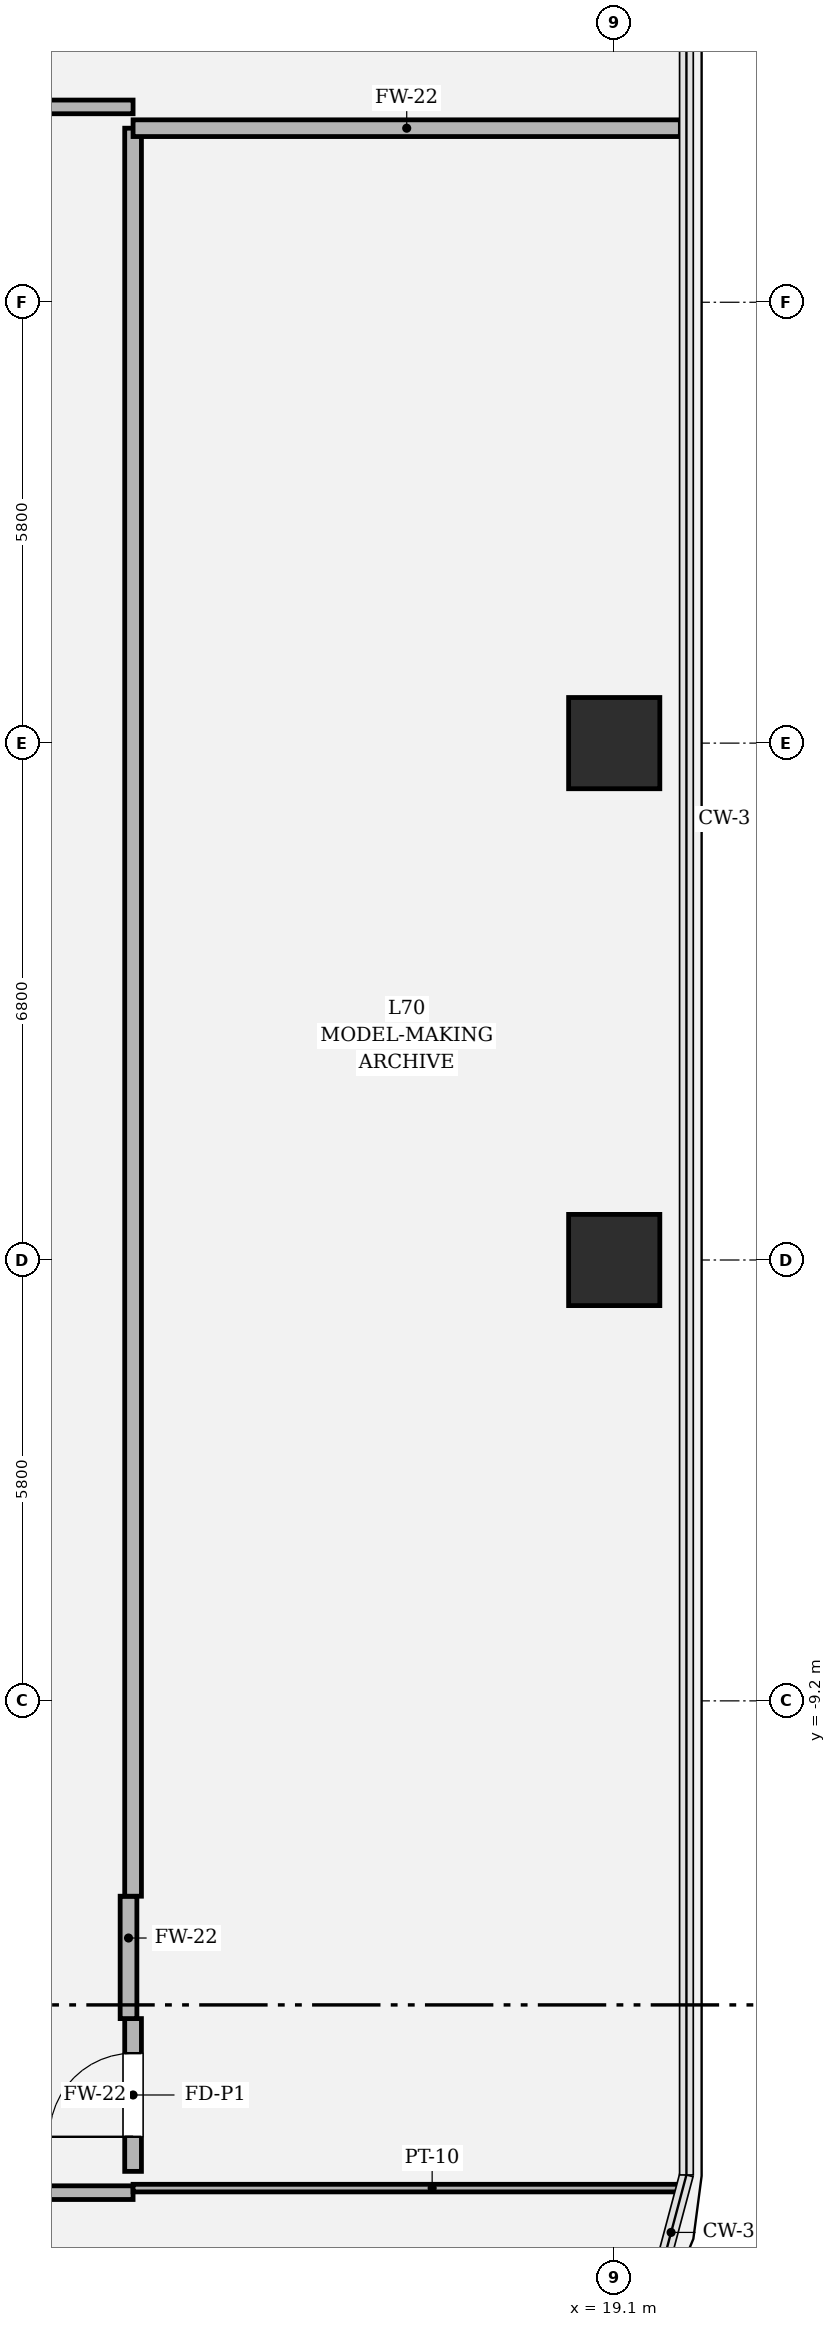
"""IFC4 building model, lengths in metres.
Left out: names, types, materials, properties, quantities, classifications, styles, units other than length and angle.
Written with IfcOpenShell. Run it as: python <this file> out.ifc"""

import sys

from ifc_helpers import new_model, si_unit, direction, frame, frame_2d, origin, origin_2d, place, context, subcontext, project, spatial, rectangle, hollow_rectangle, extrude, element, fill, save


model = new_model("IFC4")
c1 = context("Model", 3, precision=1e-05, world=origin(), true_north=direction((0.0, 1.0)))
c2 = subcontext(c1, "Body", "Model", "MODEL_VIEW")
j1 = project(units=[si_unit("LENGTHUNIT", "METRE"), si_unit("PLANEANGLEUNIT", "RADIAN")], contexts=[c1])
p1 = place(None, origin())
s1 = spatial("IfcSite", under=j1, at=p1, CompositionType="ELEMENT")
p2 = place(p1, origin())
s2 = spatial("IfcBuilding", under=s1, at=p2, CompositionType="ELEMENT")
p3 = place(p2, frame((0.0, 0.0, 296.4)))
s3 = spatial("IfcBuildingStorey", under=s2, at=p3, CompositionType="ELEMENT", Elevation=296.4)
for number, where, z_axis, x_axis in (
    (1, (19.1, -3.4, 0.0), (0.0, 0.0, 1.0), (1.0, 0.0, 0.0)),
    (2, (19.1, 3.4, 0.0), (0.0, 0.0, 1.0), (1.0, 0.0, 0.0)),
):
    element("IfcColumn", number, at=place(p3, frame(where, z_axis=z_axis, x_axis=x_axis)), inside=s3, PredefinedType="COLUMN", context=c2, shape_type="SweptSolid", body=[
        extrude(hollow_rectangle(XDim=1.2, YDim=1.2, WallThickness=0.035, at=origin_2d()), origin(), (0.0, 0.0, 1.0), 4.2),
    ])
p4 = place(p3, frame((8.772, -15.67, 0.0), z_axis=(0.0, 0.0, 1.0), x_axis=(1.0, 0.0, 0.0)))
e3 = element("IfcWall", 3, at=p4, inside=s3, PredefinedType="PARTITIONING", context=c2, shape_type="SweptSolid", body=[
    extrude(rectangle(XDim=3.998, YDim=0.18, at=frame_2d((1.999, 0.0))), origin(), (0.0, 0.0, 1.0), 3.394),
])
p5 = place(p4, frame((1.489, 0.0, 0.0)))
e4 = element("IfcOpeningElement", 4, at=p5, cuts=e3, PredefinedType="OPENING", context=c2, shape_type="SweptSolid", body=[
    extrude(rectangle(XDim=1.02, YDim=2.2, at=frame_2d((0.51, 1.1))), frame((0.0, 0.1, 0.0), z_axis=(0.0, -1.0, 0.0), x_axis=(1.0, 0.0, 0.0)), (0.0, 0.0, 1.0), 0.2),
])
p6 = place(p3, frame((12.77, -15.61, 0.0), z_axis=(0.0, 0.0, 1.0), x_axis=(1.0, 0.0, 0.0)))
e5 = element("IfcWall", 5, at=p6, inside=s3, PredefinedType="PARTITIONING", context=c2, shape_type="SweptSolid", body=[
    extrude(rectangle(XDim=7.177, YDim=0.1, at=frame_2d((3.588, 0.0))), origin(), (0.0, 0.0, 1.0), 3.394),
])
p7 = place(p3, frame((12.77, -15.39, 0.0), z_axis=(0.0, 0.0, 1.0), x_axis=(0.0, 1.0, 0.0)))
e6 = element("IfcWall", 6, at=p7, inside=s3, PredefinedType="SOLIDWALL", context=c2, shape_type="SweptSolid", body=[
    extrude(rectangle(XDim=2.01, YDim=0.22, at=frame_2d((1.005, 0.0))), origin(), (0.0, 0.0, 1.0), 3.634),
])
p8 = place(p7, frame((0.455, 0.0, 0.0)))
e7 = element("IfcOpeningElement", 7, at=p8, cuts=e6, PredefinedType="OPENING", context=c2, shape_type="SweptSolid", body=[
    extrude(rectangle(XDim=1.1, YDim=2.2, at=frame_2d((0.55, 1.1))), frame((0.0, 0.12, 0.0), z_axis=(0.0, -1.0, 0.0), x_axis=(1.0, 0.0, 0.0)), (0.0, 0.0, 1.0), 0.24),
])
p9 = place(p3, frame((12.71, -13.38, 0.0), z_axis=(0.0, 0.0, 1.0), x_axis=(0.0, 1.0, 0.0)))
e8 = element("IfcWall", 8, at=p9, inside=s3, PredefinedType="SOLIDWALL", context=c2, shape_type="SweptSolid", body=[
    extrude(rectangle(XDim=1.61, YDim=0.22, at=frame_2d((0.805, 0.0))), origin(), (0.0, 0.0, 1.0), 3.634),
])
p10 = place(p3, frame((12.77, -11.77, 0.0), z_axis=(0.0, 0.0, 1.0), x_axis=(0.0, 1.0, 0.0)))
e9 = element("IfcWall", 9, at=p10, inside=s3, PredefinedType="SOLIDWALL", context=c2, shape_type="SweptSolid", body=[
    extrude(rectangle(XDim=23.26, YDim=0.22, at=frame_2d((11.63, 0.0))), origin(), (0.0, 0.0, 1.0), 3.394),
])
p11 = place(p3, frame((12.77, 11.49, 0.0), z_axis=(0.0, 0.0, 1.0), x_axis=(1.0, 0.0, 0.0)))
e10 = element("IfcWall", 10, at=p11, inside=s3, PredefinedType="SOLIDWALL", context=c2, shape_type="SweptSolid", body=[
    extrude(rectangle(XDim=7.2, YDim=0.22, at=frame_2d((3.6, 0.0))), origin(), (0.0, 0.0, 1.0), 3.394),
])
p12 = place(p3, frame((12.77, 11.77, 0.0), z_axis=(0.0, 0.0, 1.0), x_axis=(-1.0, 0.0, 0.0)))
e11 = element("IfcWall", 11, at=p12, inside=s3, PredefinedType="PARTITIONING", context=c2, shape_type="SweptSolid", body=[
    extrude(rectangle(XDim=23.444, YDim=0.18, at=frame_2d((11.722, 0.0))), origin(), (0.0, 0.0, 1.0), 3.394),
])
p13 = place(p12, frame((11.197, 0.0, 0.0)))
e12 = element("IfcOpeningElement", 12, at=p13, cuts=e11, PredefinedType="OPENING", context=c2, shape_type="SweptSolid", body=[
    extrude(rectangle(XDim=1.05, YDim=2.2, at=frame_2d((0.525, 1.1))), frame((0.0, 0.1, 0.0), z_axis=(0.0, -1.0, 0.0), x_axis=(1.0, 0.0, 0.0)), (0.0, 0.0, 1.0), 0.2),
])
p14 = place(p8, origin())
e13 = element("IfcDoor", 13, at=p14, inside=s3, OperationType="SINGLE_SWING_LEFT", PredefinedType="DOOR", context=c2, shape_type="SweptSolid", body=[
    extrude(rectangle(XDim=1.1, YDim=2.2, at=frame_2d((0.55, 1.1))), frame((0.0, 0.025, 0.0), z_axis=(0.0, -1.0, 0.0), x_axis=(1.0, 0.0, 0.0)), (0.0, 0.0, 1.0), 0.05),
])
fill(e7, e13)
save(model, sys.argv[1])
